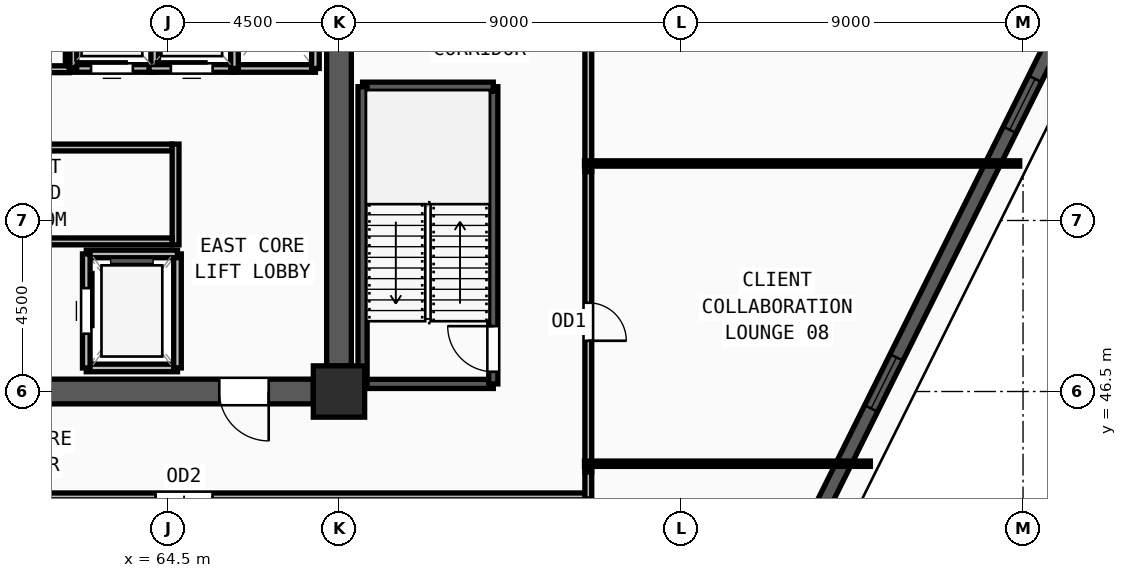
"""IFC4 building model, lengths in metres.
Left out: names, types, materials, properties, quantities, classifications, styles, units other than length and angle.
Written with IfcOpenShell. Run it as: python <this file> out.ifc"""

import sys

from ifc_helpers import new_model, si_unit, direction, frame, frame_2d, origin, origin_2d, place, context, subcontext, project, spatial, rectangle, extrude, source, transform, mapped, element, fill, save


model = new_model("IFC4")
c1 = context("Model", 3, precision=1e-05, world=origin(), true_north=direction((0.0, 1.0)))
c2 = subcontext(c1, "Body", "Model", "MODEL_VIEW")
j1 = project(units=[si_unit("LENGTHUNIT", "METRE"), si_unit("PLANEANGLEUNIT", "RADIAN")], contexts=[c1])
p1 = place(None, origin())
s1 = spatial("IfcSite", under=j1, at=p1, CompositionType="ELEMENT")
p2 = place(p1, origin())
s2 = spatial("IfcBuilding", under=s1, at=p2, CompositionType="ELEMENT")
p3 = place(p2, frame((0.0, 0.0, 213.0)))
s3 = spatial("IfcBuildingStorey", under=s2, at=p3, CompositionType="ELEMENT", Elevation=213.0)
m1 = source(origin(), c2, "Body", "SweptSolid", [
    extrude(rectangle(XDim=1.35, YDim=1.35, at=origin_2d()), origin(), (0.0, 0.0, 1.0), 3.75),
])
p4 = place(p3, frame((69.0, 46.5, 0.0), z_axis=(0.0, 0.0, 1.0), x_axis=(1.0, 0.0, 0.0)))
e1 = element("IfcColumn", 1, at=p4, inside=s3, PredefinedType="COLUMN", context=c2, shape_type="MappedRepresentation", body=[
    mapped(m1, transform((0.0, 0.0, 0.0), x_axis=(1.0, 0.0, 0.0), y_axis=(0.0, 1.0, 0.0), z_axis=(0.0, 0.0, 1.0), scale=1.0)),
])
p5 = place(p3, frame((80.069, 40.156, 0.0), z_axis=(0.0, 0.0, 1.0), x_axis=(0.445352625388, 0.895355258576, 0.0)))
e2 = element("IfcWall", 2, at=p5, inside=s3, PredefinedType="SOLIDWALL", context=c2, shape_type="SweptSolid", body=[
    extrude(rectangle(XDim=29.349, YDim=0.38, at=frame_2d((14.675, 0.0))), origin(), (0.0, 0.0, 1.0), 3.57),
])
m2 = source(origin(), c2, "Body", "SweptSolid", [
    extrude(rectangle(XDim=1.5, YDim=1.9, at=frame_2d((0.75, 0.95))), frame((0.0, 0.2, 0.0), z_axis=(0.0, -1.0, 0.0), x_axis=(1.0, 0.0, 0.0)), (0.0, 0.0, 1.0), 0.4),
])
p6 = place(p5, frame((6.587, 0.0, 0.55)))
e3 = element("IfcOpeningElement", 3, at=p6, cuts=e2, PredefinedType="OPENING", context=c2, shape_type="MappedRepresentation", body=[
    mapped(m2, transform((0.0, 0.0, 0.0), x_axis=(1.0, 0.0, 0.0), y_axis=(0.0, 1.0, 0.0), z_axis=(0.0, 0.0, 1.0), scale=1.0)),
])
p7 = place(p5, frame((14.775, 0.0, 0.55)))
e4 = element("IfcOpeningElement", 4, at=p7, cuts=e2, PredefinedType="OPENING", context=c2, shape_type="MappedRepresentation", body=[
    mapped(m2, transform((0.0, 0.0, 0.0), x_axis=(1.0, 0.0, 0.0), y_axis=(0.0, 1.0, 0.0), z_axis=(0.0, 0.0, 1.0), scale=1.0)),
])
p8 = place(p5, frame((21.262, 0.0, 0.55)))
e5 = element("IfcOpeningElement", 5, at=p8, cuts=e2, PredefinedType="OPENING", context=c2, shape_type="MappedRepresentation", body=[
    mapped(m2, transform((0.0, 0.0, 0.0), x_axis=(1.0, 0.0, 0.0), y_axis=(0.0, 1.0, 0.0), z_axis=(0.0, 0.0, 1.0), scale=1.0)),
])
p9 = place(p3, frame((69.0, 60.825, 0.0), z_axis=(0.0, 0.0, 1.0), x_axis=(0.0, -1.0, 0.0)))
e6 = element("IfcWall", 6, at=p9, inside=s3, PredefinedType="SHEAR", context=c2, shape_type="SweptSolid", body=[
    extrude(rectangle(XDim=13.65, YDim=0.65, at=frame_2d((6.825, 0.0))), origin(), (0.0, 0.0, 1.0), 3.57),
])
m3 = source(origin(), c2, "Body", "SweptSolid", [
    extrude(rectangle(XDim=1.2, YDim=2.2, at=frame_2d((0.6, 1.1))), frame((0.0, 0.335, 0.0), z_axis=(0.0, -1.0, 0.0), x_axis=(1.0, 0.0, 0.0)), (0.0, 0.0, 1.0), 0.67),
])
p10 = place(p9, frame((1.275, 0.0, 0.0)))
e7 = element("IfcOpeningElement", 7, at=p10, cuts=e6, PredefinedType="OPENING", context=c2, shape_type="MappedRepresentation", body=[
    mapped(m3, transform((0.0, 0.0, 0.0), x_axis=(1.0, 0.0, 0.0), y_axis=(0.0, 1.0, 0.0), z_axis=(0.0, 0.0, 1.0), scale=1.0)),
])
p11 = place(p3, frame((68.325, 46.5, 0.0), z_axis=(0.0, 0.0, 1.0), x_axis=(-1.0, 0.0, 0.0)))
e8 = element("IfcWall", 8, at=p11, inside=s3, PredefinedType="SHEAR", context=c2, shape_type="SweptSolid", body=[
    extrude(rectangle(XDim=7.65, YDim=0.65, at=frame_2d((3.825, 0.0))), origin(), (0.0, 0.0, 1.0), 3.57),
])
m4 = source(origin(), c2, "Body", "SweptSolid", [
    extrude(rectangle(XDim=1.3, YDim=2.2, at=frame_2d((0.65, 1.1))), frame((0.0, 0.335, 0.0), z_axis=(0.0, -1.0, 0.0), x_axis=(1.0, 0.0, 0.0)), (0.0, 0.0, 1.0), 0.67),
])
p12 = place(p11, frame((1.175, 0.0, 0.0)))
e9 = element("IfcOpeningElement", 9, at=p12, cuts=e8, PredefinedType="OPENING", context=c2, shape_type="MappedRepresentation", body=[
    mapped(m4, transform((0.0, 0.0, 0.0), x_axis=(1.0, 0.0, 0.0), y_axis=(0.0, 1.0, 0.0), z_axis=(0.0, 0.0, 1.0), scale=1.0)),
])
p13 = place(p3, frame((69.62, 46.7, 0.0), z_axis=(0.0, 0.0, 1.0), x_axis=(1.0, 0.0, 0.0)))
e10 = element("IfcWall", 10, at=p13, inside=s3, PredefinedType="SOLIDWALL", context=c2, shape_type="SweptSolid", body=[
    extrude(rectangle(XDim=3.44, YDim=0.24, at=frame_2d((1.72, 0.0))), origin(), (0.0, 0.0, 1.0), 3.57),
])
p14 = place(p3, frame((73.06, 46.7, 0.0), z_axis=(0.0, 0.0, 1.0), x_axis=(0.0, 1.0, 0.0)))
e11 = element("IfcWall", 11, at=p14, inside=s3, PredefinedType="SOLIDWALL", context=c2, shape_type="SweptSolid", body=[
    extrude(rectangle(XDim=7.82, YDim=0.24, at=frame_2d((3.91, 0.0))), origin(), (0.0, 0.0, 1.0), 3.57),
])
m5 = source(origin(), c2, "Body", "SweptSolid", [
    extrude(rectangle(XDim=1.2, YDim=2.2, at=frame_2d((0.6, 1.1))), frame((0.0, 0.13, 0.0), z_axis=(0.0, -1.0, 0.0), x_axis=(1.0, 0.0, 0.0)), (0.0, 0.0, 1.0), 0.26),
])
p15 = place(p14, frame((0.32, 0.0, 0.0)))
e12 = element("IfcOpeningElement", 12, at=p15, cuts=e11, PredefinedType="OPENING", context=c2, shape_type="MappedRepresentation", body=[
    mapped(m5, transform((0.0, 0.0, 0.0), x_axis=(1.0, 0.0, 0.0), y_axis=(0.0, 1.0, 0.0), z_axis=(0.0, 0.0, 1.0), scale=1.0)),
])
p16 = place(p3, frame((73.06, 54.52, 0.0), z_axis=(0.0, 0.0, 1.0), x_axis=(-1.0, 0.0, 0.0)))
e13 = element("IfcWall", 13, at=p16, inside=s3, PredefinedType="SOLIDWALL", context=c2, shape_type="SweptSolid", body=[
    extrude(rectangle(XDim=3.44, YDim=0.24, at=frame_2d((1.72, 0.0))), origin(), (0.0, 0.0, 1.0), 3.57),
])
p17 = place(p3, frame((69.62, 54.52, 0.0), z_axis=(0.0, 0.0, 1.0), x_axis=(0.0, -1.0, 0.0)))
e14 = element("IfcWall", 14, at=p17, inside=s3, PredefinedType="SOLIDWALL", context=c2, shape_type="SweptSolid", body=[
    extrude(rectangle(XDim=7.82, YDim=0.24, at=frame_2d((3.91, 0.0))), origin(), (0.0, 0.0, 1.0), 3.57),
])
p18 = place(p3, frame((62.35, 47.12, 0.0), z_axis=(0.0, 0.0, 1.0), x_axis=(1.0, 0.0, 0.0)))
e15 = element("IfcWall", 15, at=p18, inside=s3, PredefinedType="SOLIDWALL", context=c2, shape_type="SweptSolid", body=[
    extrude(rectangle(XDim=2.4, YDim=0.2, at=frame_2d((1.2, 0.0))), origin(), (0.0, 0.0, 1.0), 3.57),
])
p19 = place(p3, frame((64.75, 47.12, 0.0), z_axis=(0.0, 0.0, 1.0), x_axis=(0.0, 1.0, 0.0)))
e16 = element("IfcWall", 16, at=p19, inside=s3, PredefinedType="SOLIDWALL", context=c2, shape_type="SweptSolid", body=[
    extrude(rectangle(XDim=3.0, YDim=0.2, at=frame_2d((1.5, 0.0))), origin(), (0.0, 0.0, 1.0), 3.57),
])
p20 = place(p3, frame((64.75, 50.12, 0.0), z_axis=(0.0, 0.0, 1.0), x_axis=(-1.0, 0.0, 0.0)))
e17 = element("IfcWall", 17, at=p20, inside=s3, PredefinedType="SOLIDWALL", context=c2, shape_type="SweptSolid", body=[
    extrude(rectangle(XDim=2.4, YDim=0.2, at=frame_2d((1.2, 0.0))), origin(), (0.0, 0.0, 1.0), 3.57),
])
p21 = place(p3, frame((62.35, 50.12, 0.0), z_axis=(0.0, 0.0, 1.0), x_axis=(0.0, -1.0, 0.0)))
e18 = element("IfcWall", 18, at=p21, inside=s3, PredefinedType="SOLIDWALL", context=c2, shape_type="SweptSolid", body=[
    extrude(rectangle(XDim=3.0, YDim=0.2, at=frame_2d((1.5, 0.0))), origin(), (0.0, 0.0, 1.0), 3.57),
])
m6 = source(origin(), c2, "Body", "SweptSolid", [
    extrude(rectangle(XDim=1.2, YDim=2.3, at=frame_2d((0.6, 1.15))), frame((0.0, 0.11, 0.0), z_axis=(0.0, -1.0, 0.0), x_axis=(1.0, 0.0, 0.0)), (0.0, 0.0, 1.0), 0.22),
])
p22 = place(p21, frame((0.9, 0.0, 0.0)))
e19 = element("IfcOpeningElement", 19, at=p22, cuts=e18, PredefinedType="OPENING", context=c2, shape_type="MappedRepresentation", body=[
    mapped(m6, transform((0.0, 0.0, 0.0), x_axis=(1.0, 0.0, 0.0), y_axis=(0.0, 1.0, 0.0), z_axis=(0.0, 0.0, 1.0), scale=1.0)),
])
p23 = place(p3, frame((66.2, 55.0, 0.0), z_axis=(0.0, 0.0, 1.0), x_axis=(1.0, 0.0, 0.0)))
e20 = element("IfcWall", 20, at=p23, inside=s3, PredefinedType="SOLIDWALL", context=c2, shape_type="SweptSolid", body=[
    extrude(rectangle(XDim=2.18, YDim=0.2, at=frame_2d((1.09, 0.0))), origin(), (0.0, 0.0, 1.0), 3.57),
])
p24 = place(p3, frame((68.38, 55.0, 0.0), z_axis=(0.0, 0.0, 1.0), x_axis=(0.0, 1.0, 0.0)))
e21 = element("IfcWall", 21, at=p24, inside=s3, PredefinedType="SOLIDWALL", context=c2, shape_type="SweptSolid", body=[
    extrude(rectangle(XDim=2.75, YDim=0.2, at=frame_2d((1.375, 0.0))), origin(), (0.0, 0.0, 1.0), 3.57),
])
p25 = place(p3, frame((61.9, 55.0, 0.0), z_axis=(0.0, 0.0, 1.0), x_axis=(1.0, 0.0, 0.0)))
e22 = element("IfcWall", 22, at=p25, inside=s3, PredefinedType="SOLIDWALL", context=c2, shape_type="SweptSolid", body=[
    extrude(rectangle(XDim=2.25, YDim=0.2, at=frame_2d((1.125, 0.0))), origin(), (0.0, 0.0, 1.0), 3.57),
])
m7 = source(origin(), c2, "Body", "SweptSolid", [
    extrude(rectangle(XDim=1.1, YDim=2.2, at=frame_2d((0.55, 1.1))), frame((0.0, 0.11, 0.0), z_axis=(0.0, -1.0, 0.0), x_axis=(1.0, 0.0, 0.0)), (0.0, 0.0, 1.0), 0.22),
])
p26 = place(p25, frame((0.575, 0.0, 0.0)))
e23 = element("IfcOpeningElement", 23, at=p26, cuts=e22, PredefinedType="OPENING", context=c2, shape_type="MappedRepresentation", body=[
    mapped(m7, transform((0.0, 0.0, 0.0), x_axis=(1.0, 0.0, 0.0), y_axis=(0.0, 1.0, 0.0), z_axis=(0.0, 0.0, 1.0), scale=1.0)),
])
for number, where, z_axis, x_axis in (
    (24, (64.15, 55.0, 0.0), (0.0, 0.0, 1.0), (0.0, 1.0, 0.0)),
    (25, (61.9, 57.6, 0.0), (0.0, 0.0, 1.0), (0.0, -1.0, 0.0)),
):
    element("IfcWall", number, at=place(p3, frame(where, z_axis=z_axis, x_axis=x_axis)), inside=s3, PredefinedType="SOLIDWALL", context=c2, shape_type="SweptSolid", body=[
        extrude(rectangle(XDim=2.6, YDim=0.2, at=frame_2d((1.3, 0.0))), origin(), (0.0, 0.0, 1.0), 3.57),
    ])
p27 = place(p3, frame((64.0, 55.0, 0.0), z_axis=(0.0, 0.0, 1.0), x_axis=(1.0, 0.0, 0.0)))
e26 = element("IfcWall", 26, at=p27, inside=s3, PredefinedType="SOLIDWALL", context=c2, shape_type="SweptSolid", body=[
    extrude(rectangle(XDim=2.25, YDim=0.2, at=frame_2d((1.125, 0.0))), origin(), (0.0, 0.0, 1.0), 3.57),
])
p28 = place(p27, frame((0.575, 0.0, 0.0)))
e27 = element("IfcOpeningElement", 27, at=p28, cuts=e26, PredefinedType="OPENING", context=c2, shape_type="MappedRepresentation", body=[
    mapped(m7, transform((0.0, 0.0, 0.0), x_axis=(1.0, 0.0, 0.0), y_axis=(0.0, 1.0, 0.0), z_axis=(0.0, 0.0, 1.0), scale=1.0)),
])
p29 = place(p3, frame((66.25, 55.0, 0.0), z_axis=(0.0, 0.0, 1.0), x_axis=(0.0, 1.0, 0.0)))
e28 = element("IfcWall", 28, at=p29, inside=s3, PredefinedType="SOLIDWALL", context=c2, shape_type="SweptSolid", body=[
    extrude(rectangle(XDim=2.6, YDim=0.2, at=frame_2d((1.3, 0.0))), origin(), (0.0, 0.0, 1.0), 3.57),
])
p30 = place(p3, frame((55.37, 52.92, 0.0), z_axis=(0.0, 0.0, 1.0), x_axis=(1.0, 0.0, 0.0)))
e29 = element("IfcWall", 29, at=p30, inside=s3, PredefinedType="PARTITIONING", context=c2, shape_type="SweptSolid", body=[
    extrude(rectangle(XDim=9.24, YDim=0.18, at=frame_2d((4.62, 0.0))), origin(), (0.0, 0.0, 1.0), 3.57),
])
m8 = source(origin(), c2, "Body", "SweptSolid", [
    extrude(rectangle(XDim=0.85, YDim=2.1, at=frame_2d((0.425, 1.05))), frame((0.0, 0.1, 0.0), z_axis=(0.0, -1.0, 0.0), x_axis=(1.0, 0.0, 0.0)), (0.0, 0.0, 1.0), 0.2),
])
p31 = place(p30, frame((4.205, 0.0, 0.0)))
e30 = element("IfcOpeningElement", 30, at=p31, cuts=e29, PredefinedType="OPENING", context=c2, shape_type="MappedRepresentation", body=[
    mapped(m8, transform((0.0, 0.0, 0.0), x_axis=(1.0, 0.0, 0.0), y_axis=(0.0, 1.0, 0.0), z_axis=(0.0, 0.0, 1.0), scale=1.0)),
])
p32 = place(p3, frame((59.81, 54.98, 0.0), z_axis=(0.0, 0.0, 1.0), x_axis=(1.0, 0.0, 0.0)))
e31 = element("IfcWall", 31, at=p32, inside=s3, PredefinedType="PARTITIONING", context=c2, shape_type="SweptSolid", body=[
    extrude(rectangle(XDim=2.09, YDim=0.18, at=frame_2d((1.045, 0.0))), origin(), (0.0, 0.0, 1.0), 3.57),
])
p33 = place(p32, frame((0.635, 0.0, 0.0)))
e32 = element("IfcOpeningElement", 32, at=p33, cuts=e31, PredefinedType="OPENING", context=c2, shape_type="MappedRepresentation", body=[
    mapped(m8, transform((0.0, 0.0, 0.0), x_axis=(1.0, 0.0, 0.0), y_axis=(0.0, 1.0, 0.0), z_axis=(0.0, 0.0, 1.0), scale=1.0)),
])
p34 = place(p3, frame((75.56, 67.215, 0.0), z_axis=(0.0, 0.0, 1.0), x_axis=(0.0, -1.0, 0.0)))
e33 = element("IfcWall", 33, at=p34, inside=s3, PredefinedType="PARTITIONING", context=c2, shape_type="SweptSolid", body=[
    extrude(rectangle(XDim=14.93, YDim=0.18, at=frame_2d((7.465, 0.0))), origin(), (0.0, 0.0, 1.0), 3.57),
])
m9 = source(origin(), c2, "Body", "SweptSolid", [
    extrude(rectangle(XDim=1.5, YDim=2.2, at=frame_2d((0.75, 1.1))), frame((0.0, 0.1, 0.0), z_axis=(0.0, -1.0, 0.0), x_axis=(1.0, 0.0, 0.0)), (0.0, 0.0, 1.0), 0.2),
])
p35 = place(p34, frame((6.715, 0.0, 0.0)))
e34 = element("IfcOpeningElement", 34, at=p35, cuts=e33, PredefinedType="OPENING", context=c2, shape_type="MappedRepresentation", body=[
    mapped(m9, transform((0.0, 0.0, 0.0), x_axis=(1.0, 0.0, 0.0), y_axis=(0.0, 1.0, 0.0), z_axis=(0.0, 0.0, 1.0), scale=1.0)),
])
p36 = place(p3, frame((75.63, 43.74, 0.0), z_axis=(0.0, 0.0, 1.0), x_axis=(-1.0, 0.0, 0.0)))
e35 = element("IfcWall", 35, at=p36, inside=s3, PredefinedType="PARTITIONING", context=c2, shape_type="SweptSolid", body=[
    extrude(rectangle(XDim=21.415, YDim=0.18, at=frame_2d((10.708, 0.0))), origin(), (0.0, 0.0, 1.0), 3.57),
])
p37 = place(p36, frame((9.957, 0.0, 0.0)))
e36 = element("IfcOpeningElement", 36, at=p37, cuts=e35, PredefinedType="OPENING", context=c2, shape_type="MappedRepresentation", body=[
    mapped(m9, transform((0.0, 0.0, 0.0), x_axis=(1.0, 0.0, 0.0), y_axis=(0.0, 1.0, 0.0), z_axis=(0.0, 0.0, 1.0), scale=1.0)),
])
p38 = place(p3, frame((75.56, 52.285, 0.0), z_axis=(0.0, 0.0, 1.0), x_axis=(0.0, -1.0, 0.0)))
e37 = element("IfcWall", 37, at=p38, inside=s3, PredefinedType="PARTITIONING", context=c2, shape_type="SweptSolid", body=[
    extrude(rectangle(XDim=7.9, YDim=0.18, at=frame_2d((3.95, 0.0))), origin(), (0.0, 0.0, 1.0), 3.57),
])
m10 = source(origin(), c2, "Body", "SweptSolid", [
    extrude(rectangle(XDim=1.0, YDim=2.2, at=frame_2d((0.5, 1.1))), frame((0.0, 0.1, 0.0), z_axis=(0.0, -1.0, 0.0), x_axis=(1.0, 0.0, 0.0)), (0.0, 0.0, 1.0), 0.2),
])
p39 = place(p38, frame((3.45, 0.0, 0.0)))
e38 = element("IfcOpeningElement", 38, at=p39, cuts=e37, PredefinedType="OPENING", context=c2, shape_type="MappedRepresentation", body=[
    mapped(m10, transform((0.0, 0.0, 0.0), x_axis=(1.0, 0.0, 0.0), y_axis=(0.0, 1.0, 0.0), z_axis=(0.0, 0.0, 1.0), scale=1.0)),
])
p40 = place(p3, frame((62.01, 55.02, 0.0), z_axis=(0.0, 0.0, 1.0), x_axis=(0.0, 1.0, 0.0)))
e39 = element("IfcWall", 39, at=p40, inside=s3, PredefinedType="PARTITIONING", context=c2, shape_type="SweptSolid", body=[
    extrude(rectangle(XDim=2.88, YDim=0.18, at=frame_2d((1.44, 0.0))), origin(), (0.0, 0.0, 1.0), 3.57),
])
p41 = place(p3, frame((75.56, 44.385, 0.0), z_axis=(0.0, 0.0, 1.0), x_axis=(0.0, -1.0, 0.0)))
e40 = element("IfcWall", 40, at=p41, inside=s3, PredefinedType="PARTITIONING", context=c2, shape_type="SweptSolid", body=[
    extrude(rectangle(XDim=0.715, YDim=0.18, at=frame_2d((0.357, 0.0))), origin(), (0.0, 0.0, 1.0), 3.57),
])
p42 = place(p3, frame((75.46, 44.6, 0.0), z_axis=(0.0, 0.0, 1.0), x_axis=(1.0, 0.0, 0.0)))
e41 = element("IfcWall", 41, at=p42, inside=s3, PredefinedType="PARTITIONING", context=c2, shape_type="SweptSolid", body=[
    extrude(rectangle(XDim=7.523, YDim=0.14, at=frame_2d((3.761, 0.0))), origin(), (0.0, 0.0, 1.0), 3.57),
])
p43 = place(p3, frame((75.46, 52.5, 0.0), z_axis=(0.0, 0.0, 1.0), x_axis=(1.0, 0.0, 0.0)))
e42 = element("IfcWall", 42, at=p43, inside=s3, PredefinedType="PARTITIONING", context=c2, shape_type="SweptSolid", body=[
    extrude(rectangle(XDim=11.452, YDim=0.14, at=frame_2d((5.726, 0.0))), origin(), (0.0, 0.0, 1.0), 3.57),
])
p44 = place(p3, frame((64.7, 50.36, 0.0), z_axis=(0.0, 0.0, 1.0), x_axis=(0.0, 1.0, 0.0)))
e43 = element("IfcWall", 43, at=p44, inside=s3, PredefinedType="PARTITIONING", context=c2, shape_type="SweptSolid", body=[
    extrude(rectangle(XDim=2.65, YDim=0.18, at=frame_2d((1.325, 0.0))), origin(), (0.0, 0.0, 1.0), 3.57),
])
p45 = place(p3, frame((55.37, 50.45, 0.0), z_axis=(0.0, 0.0, 1.0), x_axis=(1.0, 0.0, 0.0)))
e44 = element("IfcWall", 44, at=p45, inside=s3, PredefinedType="PARTITIONING", context=c2, shape_type="SweptSolid", body=[
    extrude(rectangle(XDim=9.24, YDim=0.18, at=frame_2d((4.62, 0.0))), origin(), (0.0, 0.0, 1.0), 3.57),
])
m11 = source(origin(), c2, "Body", "SweptSolid", [
    extrude(rectangle(XDim=1.5, YDim=1.9, at=frame_2d((0.75, 0.95))), frame((0.0, 0.03, 0.0), z_axis=(0.0, -1.0, 0.0), x_axis=(1.0, 0.0, 0.0)), (0.0, 0.0, 1.0), 0.06),
])
p46 = place(p6, origin())
e45 = element("IfcWindow", 45, at=p46, inside=s3, PartitioningType="DOUBLE_PANEL_VERTICAL", PredefinedType="WINDOW", context=c2, shape_type="MappedRepresentation", body=[
    mapped(m11, transform((0.0, 0.0, 0.0), x_axis=(1.0, 0.0, 0.0), y_axis=(0.0, 1.0, 0.0), z_axis=(0.0, 0.0, 1.0), scale=1.0)),
])
fill(e3, e45)
p47 = place(p7, origin())
e46 = element("IfcWindow", 46, at=p47, inside=s3, PartitioningType="DOUBLE_PANEL_VERTICAL", PredefinedType="WINDOW", context=c2, shape_type="MappedRepresentation", body=[
    mapped(m11, transform((0.0, 0.0, 0.0), x_axis=(1.0, 0.0, 0.0), y_axis=(0.0, 1.0, 0.0), z_axis=(0.0, 0.0, 1.0), scale=1.0)),
])
fill(e4, e46)
m12 = source(origin(), c2, "Body", "SweptSolid", [
    extrude(rectangle(XDim=1.3, YDim=2.2, at=frame_2d((0.65, 1.1))), frame((0.0, 0.025, 0.0), z_axis=(0.0, -1.0, 0.0), x_axis=(1.0, 0.0, 0.0)), (0.0, 0.0, 1.0), 0.05),
])
p48 = place(p12, origin())
e47 = element("IfcDoor", 47, at=p48, inside=s3, OperationType="SINGLE_SWING_LEFT", PredefinedType="DOOR", context=c2, shape_type="MappedRepresentation", body=[
    mapped(m12, transform((0.0, 0.0, 0.0), x_axis=(1.0, 0.0, 0.0), y_axis=(0.0, 1.0, 0.0), z_axis=(0.0, 0.0, 1.0), scale=1.0)),
])
fill(e9, e47)
m13 = source(origin(), c2, "Body", "SweptSolid", [
    extrude(rectangle(XDim=1.2, YDim=2.2, at=frame_2d((0.6, 1.1))), frame((0.0, 0.025, 0.0), z_axis=(0.0, -1.0, 0.0), x_axis=(1.0, 0.0, 0.0)), (0.0, 0.0, 1.0), 0.05),
])
p49 = place(p15, origin())
e48 = element("IfcDoor", 48, at=p49, inside=s3, OperationType="SINGLE_SWING_RIGHT", PredefinedType="DOOR", context=c2, shape_type="MappedRepresentation", body=[
    mapped(m13, transform((0.0, 0.0, 0.0), x_axis=(1.0, 0.0, 0.0), y_axis=(0.0, 1.0, 0.0), z_axis=(0.0, 0.0, 1.0), scale=1.0)),
])
fill(e12, e48)
m14 = source(origin(), c2, "Body", "SweptSolid", [
    extrude(rectangle(XDim=1.2, YDim=2.3, at=frame_2d((0.6, 1.15))), frame((0.0, 0.025, 0.0), z_axis=(0.0, -1.0, 0.0), x_axis=(1.0, 0.0, 0.0)), (0.0, 0.0, 1.0), 0.05),
])
p50 = place(p22, origin())
e49 = element("IfcDoor", 49, at=p50, inside=s3, OperationType="SLIDING_TO_LEFT", PredefinedType="DOOR", context=c2, shape_type="MappedRepresentation", body=[
    mapped(m14, transform((0.0, 0.0, 0.0), x_axis=(1.0, 0.0, 0.0), y_axis=(0.0, 1.0, 0.0), z_axis=(0.0, 0.0, 1.0), scale=1.0)),
])
fill(e19, e49)
m15 = source(origin(), c2, "Body", "SweptSolid", [
    extrude(rectangle(XDim=1.1, YDim=2.2, at=frame_2d((0.55, 1.1))), frame((0.0, 0.025, 0.0), z_axis=(0.0, -1.0, 0.0), x_axis=(1.0, 0.0, 0.0)), (0.0, 0.0, 1.0), 0.05),
])
p51 = place(p26, origin())
e50 = element("IfcDoor", 50, at=p51, inside=s3, OperationType="SLIDING_TO_LEFT", PredefinedType="DOOR", context=c2, shape_type="MappedRepresentation", body=[
    mapped(m15, transform((0.0, 0.0, 0.0), x_axis=(1.0, 0.0, 0.0), y_axis=(0.0, 1.0, 0.0), z_axis=(0.0, 0.0, 1.0), scale=1.0)),
])
fill(e23, e50)
p52 = place(p28, origin())
e51 = element("IfcDoor", 51, at=p52, inside=s3, OperationType="SLIDING_TO_LEFT", PredefinedType="DOOR", context=c2, shape_type="MappedRepresentation", body=[
    mapped(m15, transform((0.0, 0.0, 0.0), x_axis=(1.0, 0.0, 0.0), y_axis=(0.0, 1.0, 0.0), z_axis=(0.0, 0.0, 1.0), scale=1.0)),
])
fill(e27, e51)
m16 = source(origin(), c2, "Body", "SweptSolid", [
    extrude(rectangle(XDim=1.5, YDim=2.2, at=frame_2d((0.75, 1.1))), frame((0.0, 0.025, 0.0), z_axis=(0.0, -1.0, 0.0), x_axis=(1.0, 0.0, 0.0)), (0.0, 0.0, 1.0), 0.05),
])
p53 = place(p37, origin())
e52 = element("IfcDoor", 52, at=p53, inside=s3, OperationType="DOUBLE_DOOR_SINGLE_SWING", PredefinedType="DOOR", context=c2, shape_type="MappedRepresentation", body=[
    mapped(m16, transform((0.0, 0.0, 0.0), x_axis=(1.0, 0.0, 0.0), y_axis=(0.0, 1.0, 0.0), z_axis=(0.0, 0.0, 1.0), scale=1.0)),
])
fill(e36, e52)
m17 = source(origin(), c2, "Body", "SweptSolid", [
    extrude(rectangle(XDim=1.0, YDim=2.2, at=frame_2d((0.5, 1.1))), frame((0.0, 0.025, 0.0), z_axis=(0.0, -1.0, 0.0), x_axis=(1.0, 0.0, 0.0)), (0.0, 0.0, 1.0), 0.05),
])
p54 = place(p39, origin())
e53 = element("IfcDoor", 53, at=p54, inside=s3, OperationType="SINGLE_SWING_RIGHT", PredefinedType="DOOR", context=c2, shape_type="MappedRepresentation", body=[
    mapped(m17, transform((0.0, 0.0, 0.0), x_axis=(1.0, 0.0, 0.0), y_axis=(0.0, 1.0, 0.0), z_axis=(0.0, 0.0, 1.0), scale=1.0)),
])
fill(e38, e53)
save(model, sys.argv[1])
